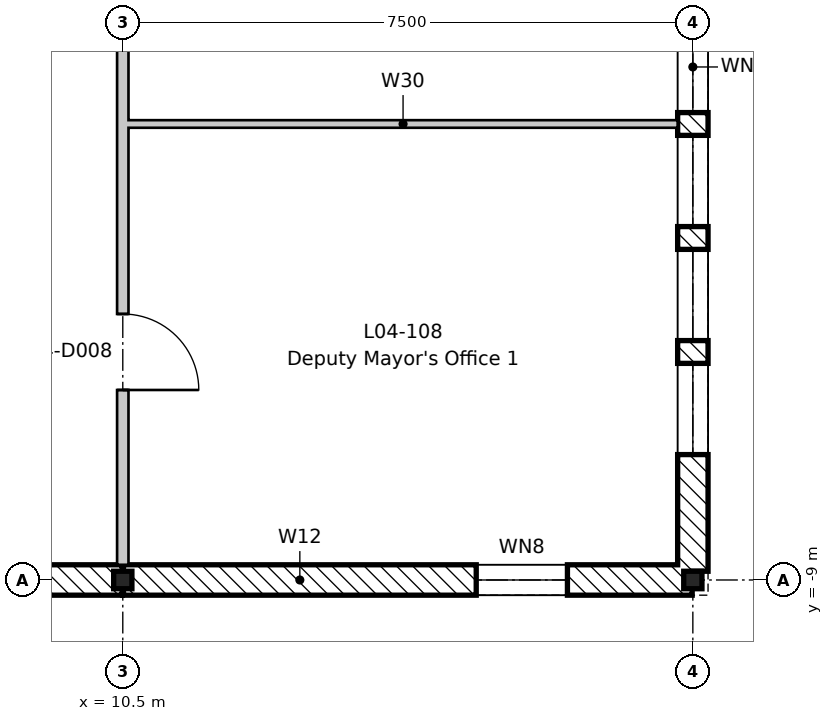
"""IFC4 building model, lengths in metres.
Left out: names, types, materials, properties, quantities, classifications, styles, units other than length and angle.
Written with IfcOpenShell. Run it as: python <this file> out.ifc"""

import sys

from ifc_helpers import new_model, si_unit, direction, frame, frame_2d, origin, origin_2d, place, context, subcontext, project, spatial, rectangle, i_section, extrude, element, fill, save


model = new_model("IFC4")
c1 = context("Model", 3, precision=1e-05, world=origin(), true_north=direction((0.0, 1.0)))
c2 = subcontext(c1, "Body", "Model", "MODEL_VIEW")
j1 = project(units=[si_unit("LENGTHUNIT", "METRE"), si_unit("PLANEANGLEUNIT", "RADIAN")], contexts=[c1])
p1 = place(None, origin())
s1 = spatial("IfcSite", under=j1, at=p1, CompositionType="ELEMENT")
p2 = place(p1, origin())
s2 = spatial("IfcBuilding", under=s1, at=p2, CompositionType="ELEMENT")
p3 = place(p2, frame((0.0, 0.0, 18.6)))
s3 = spatial("IfcBuildingStorey", under=s2, at=p3, CompositionType="ELEMENT", Elevation=18.6)
for number, where, z_axis, x_axis in (
    (1, (10.5, -9.0, -0.2), (0.0, 0.0, 1.0), (1.0, 0.0, 0.0)),
    (2, (18.0, -9.0, -0.2), (0.0, 0.0, 1.0), (1.0, 0.0, 0.0)),
):
    element("IfcColumn", number, at=place(p3, frame(where, z_axis=z_axis, x_axis=x_axis)), inside=s3, PredefinedType="COLUMN", context=c2, shape_type="SweptSolid", body=[
        extrude(i_section(OverallWidth=0.24, OverallDepth=0.23, WebThickness=0.008, FlangeThickness=0.012, FilletRadius=0.021, at=origin_2d()), origin(), (0.0, 0.0, 1.0), 4.2),
    ])
p4 = place(p3, frame((18.0, -0.115, 0.0), z_axis=(0.0, 0.0, 1.0), x_axis=(0.0, -1.0, 0.0)))
e3 = element("IfcWall", 3, at=p4, inside=s3, PredefinedType="STANDARD", context=c2, shape_type="SweptSolid", body=[
    extrude(rectangle(XDim=8.77, YDim=0.4, at=frame_2d((4.385, 0.0))), origin(), (0.0, 0.0, 1.0), 3.6),
])
p5 = place(p4, frame((6.035, 0.0, 0.6)))
e4 = element("IfcOpeningElement", 4, at=p5, cuts=e3, PredefinedType="OPENING", context=c2, shape_type="SweptSolid", body=[
    extrude(rectangle(XDim=1.2, YDim=2.7, at=frame_2d((0.6, 1.35))), frame((0.0, 0.21, 0.0), z_axis=(0.0, -1.0, 0.0), x_axis=(1.0, 0.0, 0.0)), (0.0, 0.0, 1.0), 0.42),
])
p6 = place(p4, frame((4.535, 0.0, 0.6)))
e5 = element("IfcOpeningElement", 5, at=p6, cuts=e3, PredefinedType="OPENING", context=c2, shape_type="SweptSolid", body=[
    extrude(rectangle(XDim=1.2, YDim=2.7, at=frame_2d((0.6, 1.35))), frame((0.0, 0.21, 0.0), z_axis=(0.0, -1.0, 0.0), x_axis=(1.0, 0.0, 0.0)), (0.0, 0.0, 1.0), 0.42),
])
p7 = place(p4, frame((3.035, 0.0, 0.6)))
e6 = element("IfcOpeningElement", 6, at=p7, cuts=e3, PredefinedType="OPENING", context=c2, shape_type="SweptSolid", body=[
    extrude(rectangle(XDim=1.2, YDim=2.7, at=frame_2d((0.6, 1.35))), frame((0.0, 0.21, 0.0), z_axis=(0.0, -1.0, 0.0), x_axis=(1.0, 0.0, 0.0)), (0.0, 0.0, 1.0), 0.42),
])
p8 = place(p4, frame((1.535, 0.0, 0.6)))
e7 = element("IfcOpeningElement", 7, at=p8, cuts=e3, PredefinedType="OPENING", context=c2, shape_type="SweptSolid", body=[
    extrude(rectangle(XDim=1.2, YDim=2.7, at=frame_2d((0.6, 1.35))), frame((0.0, 0.21, 0.0), z_axis=(0.0, -1.0, 0.0), x_axis=(1.0, 0.0, 0.0)), (0.0, 0.0, 1.0), 0.42),
])
p9 = place(p3, frame((10.491, -9.0, 0.0), z_axis=(0.0, 0.0, 1.0), x_axis=(-1.0, 0.0, 0.0)))
e8 = element("IfcWall", 8, at=p9, inside=s3, PredefinedType="STANDARD", context=c2, shape_type="SweptSolid", body=[
    extrude(rectangle(XDim=2.982, YDim=0.4, at=frame_2d((1.491, 0.0))), origin(), (0.0, 0.0, 1.0), 3.8),
])
p10 = place(p3, frame((17.991, -9.0, 0.0), z_axis=(0.0, 0.0, 1.0), x_axis=(-1.0, 0.0, 0.0)))
e9 = element("IfcWall", 9, at=p10, inside=s3, PredefinedType="STANDARD", context=c2, shape_type="SweptSolid", body=[
    extrude(rectangle(XDim=7.482, YDim=0.4, at=frame_2d((3.741, 0.0))), origin(), (0.0, 0.0, 1.0), 3.67),
])
p11 = place(p10, frame((1.641, 0.0, 0.6)))
e10 = element("IfcOpeningElement", 10, at=p11, cuts=e9, PredefinedType="OPENING", context=c2, shape_type="SweptSolid", body=[
    extrude(rectangle(XDim=1.2, YDim=2.7, at=frame_2d((0.6, 1.35))), frame((0.0, 0.21, 0.0), z_axis=(0.0, -1.0, 0.0), x_axis=(1.0, 0.0, 0.0)), (0.0, 0.0, 1.0), 0.42),
])
p12 = place(p3, frame((10.575, -3.0, 0.0), z_axis=(0.0, 0.0, 1.0), x_axis=(1.0, 0.0, 0.0)))
e11 = element("IfcWall", 11, at=p12, inside=s3, PredefinedType="PARTITIONING", context=c2, shape_type="SweptSolid", body=[
    extrude(rectangle(XDim=7.225, YDim=0.1, at=frame_2d((3.613, 0.0))), origin(), (0.0, 0.0, 1.0), 4.0),
])
p13 = place(p3, frame((10.5, -8.8, 0.0), z_axis=(0.0, 0.0, 1.0), x_axis=(0.0, 1.0, 0.0)))
e12 = element("IfcWall", 12, at=p13, inside=s3, PredefinedType="PARTITIONING", context=c2, shape_type="SweptSolid", body=[
    extrude(rectangle(XDim=79.3, YDim=0.15, at=frame_2d((39.65, 0.0))), origin(), (0.0, 0.0, 1.0), 3.48),
])
p14 = place(p13, frame((2.3, 0.0, 0.0)))
e13 = element("IfcOpeningElement", 13, at=p14, cuts=e12, PredefinedType="OPENING", context=c2, shape_type="SweptSolid", body=[
    extrude(rectangle(XDim=1.0, YDim=2.1, at=frame_2d((0.5, 1.05))), frame((0.0, 0.085, 0.0), z_axis=(0.0, -1.0, 0.0), x_axis=(1.0, 0.0, 0.0)), (0.0, 0.0, 1.0), 0.17),
])
p15 = place(p13, frame((9.55, 0.0, 0.0)))
e14 = element("IfcOpeningElement", 14, at=p15, cuts=e12, PredefinedType="OPENING", context=c2, shape_type="SweptSolid", body=[
    extrude(rectangle(XDim=1.0, YDim=2.1, at=frame_2d((0.5, 1.05))), frame((0.0, 0.085, 0.0), z_axis=(0.0, -1.0, 0.0), x_axis=(1.0, 0.0, 0.0)), (0.0, 0.0, 1.0), 0.17),
])
p16 = place(p13, frame((15.6, 0.0, 0.0)))
e15 = element("IfcOpeningElement", 15, at=p16, cuts=e12, PredefinedType="OPENING", context=c2, shape_type="SweptSolid", body=[
    extrude(rectangle(XDim=1.4, YDim=2.1, at=frame_2d((0.7, 1.05))), frame((0.0, 0.085, 0.0), z_axis=(0.0, -1.0, 0.0), x_axis=(1.0, 0.0, 0.0)), (0.0, 0.0, 1.0), 0.17),
])
p17 = place(p13, frame((21.8, 0.0, 0.0)))
e16 = element("IfcOpeningElement", 16, at=p17, cuts=e12, PredefinedType="OPENING", context=c2, shape_type="SweptSolid", body=[
    extrude(rectangle(XDim=1.0, YDim=2.1, at=frame_2d((0.5, 1.05))), frame((0.0, 0.085, 0.0), z_axis=(0.0, -1.0, 0.0), x_axis=(1.0, 0.0, 0.0)), (0.0, 0.0, 1.0), 0.17),
])
p18 = place(p13, frame((24.8, 0.0, 0.0)))
e17 = element("IfcOpeningElement", 17, at=p18, cuts=e12, PredefinedType="OPENING", context=c2, shape_type="SweptSolid", body=[
    extrude(rectangle(XDim=1.0, YDim=2.1, at=frame_2d((0.5, 1.05))), frame((0.0, 0.085, 0.0), z_axis=(0.0, -1.0, 0.0), x_axis=(1.0, 0.0, 0.0)), (0.0, 0.0, 1.0), 0.17),
])
p19 = place(p13, frame((30.6, 0.0, 0.0)))
e18 = element("IfcOpeningElement", 18, at=p19, cuts=e12, PredefinedType="OPENING", context=c2, shape_type="SweptSolid", body=[
    extrude(rectangle(XDim=1.4, YDim=2.1, at=frame_2d((0.7, 1.05))), frame((0.0, 0.085, 0.0), z_axis=(0.0, -1.0, 0.0), x_axis=(1.0, 0.0, 0.0)), (0.0, 0.0, 1.0), 0.17),
])
p20 = place(p13, frame((38.3, 0.0, 0.0)))
e19 = element("IfcOpeningElement", 19, at=p20, cuts=e12, PredefinedType="OPENING", context=c2, shape_type="SweptSolid", body=[
    extrude(rectangle(XDim=1.0, YDim=2.1, at=frame_2d((0.5, 1.05))), frame((0.0, 0.085, 0.0), z_axis=(0.0, -1.0, 0.0), x_axis=(1.0, 0.0, 0.0)), (0.0, 0.0, 1.0), 0.17),
])
p21 = place(p13, frame((42.8, 0.0, 0.0)))
e20 = element("IfcOpeningElement", 20, at=p21, cuts=e12, PredefinedType="OPENING", context=c2, shape_type="SweptSolid", body=[
    extrude(rectangle(XDim=1.0, YDim=2.1, at=frame_2d((0.5, 1.05))), frame((0.0, 0.085, 0.0), z_axis=(0.0, -1.0, 0.0), x_axis=(1.0, 0.0, 0.0)), (0.0, 0.0, 1.0), 0.17),
])
p22 = place(p13, frame((45.8, 0.0, 0.0)))
e21 = element("IfcOpeningElement", 21, at=p22, cuts=e12, PredefinedType="OPENING", context=c2, shape_type="SweptSolid", body=[
    extrude(rectangle(XDim=1.0, YDim=2.1, at=frame_2d((0.5, 1.05))), frame((0.0, 0.085, 0.0), z_axis=(0.0, -1.0, 0.0), x_axis=(1.0, 0.0, 0.0)), (0.0, 0.0, 1.0), 0.17),
])
p23 = place(p13, frame((50.3, 0.0, 0.0)))
e22 = element("IfcOpeningElement", 22, at=p23, cuts=e12, PredefinedType="OPENING", context=c2, shape_type="SweptSolid", body=[
    extrude(rectangle(XDim=1.0, YDim=2.1, at=frame_2d((0.5, 1.05))), frame((0.0, 0.085, 0.0), z_axis=(0.0, -1.0, 0.0), x_axis=(1.0, 0.0, 0.0)), (0.0, 0.0, 1.0), 0.17),
])
p24 = place(p13, frame((54.8, 0.0, 0.0)))
e23 = element("IfcOpeningElement", 23, at=p24, cuts=e12, PredefinedType="OPENING", context=c2, shape_type="SweptSolid", body=[
    extrude(rectangle(XDim=1.0, YDim=2.1, at=frame_2d((0.5, 1.05))), frame((0.0, 0.085, 0.0), z_axis=(0.0, -1.0, 0.0), x_axis=(1.0, 0.0, 0.0)), (0.0, 0.0, 1.0), 0.17),
])
p25 = place(p13, frame((57.8, 0.0, 0.0)))
e24 = element("IfcOpeningElement", 24, at=p25, cuts=e12, PredefinedType="OPENING", context=c2, shape_type="SweptSolid", body=[
    extrude(rectangle(XDim=1.0, YDim=2.1, at=frame_2d((0.5, 1.05))), frame((0.0, 0.085, 0.0), z_axis=(0.0, -1.0, 0.0), x_axis=(1.0, 0.0, 0.0)), (0.0, 0.0, 1.0), 0.17),
])
p26 = place(p13, frame((63.6, 0.0, 0.0)))
e25 = element("IfcOpeningElement", 25, at=p26, cuts=e12, PredefinedType="OPENING", context=c2, shape_type="SweptSolid", body=[
    extrude(rectangle(XDim=1.4, YDim=2.1, at=frame_2d((0.7, 1.05))), frame((0.0, 0.085, 0.0), z_axis=(0.0, -1.0, 0.0), x_axis=(1.0, 0.0, 0.0)), (0.0, 0.0, 1.0), 0.17),
])
p27 = place(p13, frame((69.8, 0.0, 0.0)))
e26 = element("IfcOpeningElement", 26, at=p27, cuts=e12, PredefinedType="OPENING", context=c2, shape_type="SweptSolid", body=[
    extrude(rectangle(XDim=1.0, YDim=2.1, at=frame_2d((0.5, 1.05))), frame((0.0, 0.085, 0.0), z_axis=(0.0, -1.0, 0.0), x_axis=(1.0, 0.0, 0.0)), (0.0, 0.0, 1.0), 0.17),
])
p28 = place(p13, frame((72.8, 0.0, 0.0)))
e27 = element("IfcOpeningElement", 27, at=p28, cuts=e12, PredefinedType="OPENING", context=c2, shape_type="SweptSolid", body=[
    extrude(rectangle(XDim=1.0, YDim=2.1, at=frame_2d((0.5, 1.05))), frame((0.0, 0.085, 0.0), z_axis=(0.0, -1.0, 0.0), x_axis=(1.0, 0.0, 0.0)), (0.0, 0.0, 1.0), 0.17),
])
p29 = place(p5, origin())
e28 = element("IfcWindow", 28, at=p29, inside=s3, PartitioningType="SINGLE_PANEL", PredefinedType="WINDOW", context=c2, shape_type="SweptSolid", body=[
    extrude(rectangle(XDim=1.2, YDim=2.7, at=frame_2d((0.6, 1.35))), frame((0.0, 0.03, 0.0), z_axis=(0.0, -1.0, 0.0), x_axis=(1.0, 0.0, 0.0)), (0.0, 0.0, 1.0), 0.06),
])
fill(e4, e28)
p30 = place(p6, origin())
e29 = element("IfcWindow", 29, at=p30, inside=s3, PartitioningType="SINGLE_PANEL", PredefinedType="WINDOW", context=c2, shape_type="SweptSolid", body=[
    extrude(rectangle(XDim=1.2, YDim=2.7, at=frame_2d((0.6, 1.35))), frame((0.0, 0.03, 0.0), z_axis=(0.0, -1.0, 0.0), x_axis=(1.0, 0.0, 0.0)), (0.0, 0.0, 1.0), 0.06),
])
fill(e5, e29)
p31 = place(p7, origin())
e30 = element("IfcWindow", 30, at=p31, inside=s3, PartitioningType="SINGLE_PANEL", PredefinedType="WINDOW", context=c2, shape_type="SweptSolid", body=[
    extrude(rectangle(XDim=1.2, YDim=2.7, at=frame_2d((0.6, 1.35))), frame((0.0, 0.03, 0.0), z_axis=(0.0, -1.0, 0.0), x_axis=(1.0, 0.0, 0.0)), (0.0, 0.0, 1.0), 0.06),
])
fill(e6, e30)
p32 = place(p8, origin())
e31 = element("IfcWindow", 31, at=p32, inside=s3, PartitioningType="SINGLE_PANEL", PredefinedType="WINDOW", context=c2, shape_type="SweptSolid", body=[
    extrude(rectangle(XDim=1.2, YDim=2.7, at=frame_2d((0.6, 1.35))), frame((0.0, 0.03, 0.0), z_axis=(0.0, -1.0, 0.0), x_axis=(1.0, 0.0, 0.0)), (0.0, 0.0, 1.0), 0.06),
])
fill(e7, e31)
p33 = place(p11, origin())
e32 = element("IfcWindow", 32, at=p33, inside=s3, PartitioningType="SINGLE_PANEL", PredefinedType="WINDOW", context=c2, shape_type="SweptSolid", body=[
    extrude(rectangle(XDim=1.2, YDim=2.7, at=frame_2d((0.6, 1.35))), frame((0.0, 0.03, 0.0), z_axis=(0.0, -1.0, 0.0), x_axis=(1.0, 0.0, 0.0)), (0.0, 0.0, 1.0), 0.06),
])
fill(e10, e32)
p34 = place(p14, frame((1.0, 0.0, 0.0), z_axis=(0.0, 0.0, 1.0), x_axis=(-1.0, 0.0, 0.0)))
e33 = element("IfcDoor", 33, at=p34, inside=s3, OperationType="SINGLE_SWING_RIGHT", PredefinedType="DOOR", context=c2, shape_type="SweptSolid", body=[
    extrude(rectangle(XDim=1.0, YDim=2.1, at=frame_2d((0.5, 1.05))), frame((0.0, 0.025, 0.0), z_axis=(0.0, -1.0, 0.0), x_axis=(1.0, 0.0, 0.0)), (0.0, 0.0, 1.0), 0.05),
])
fill(e13, e33)
save(model, sys.argv[1])
